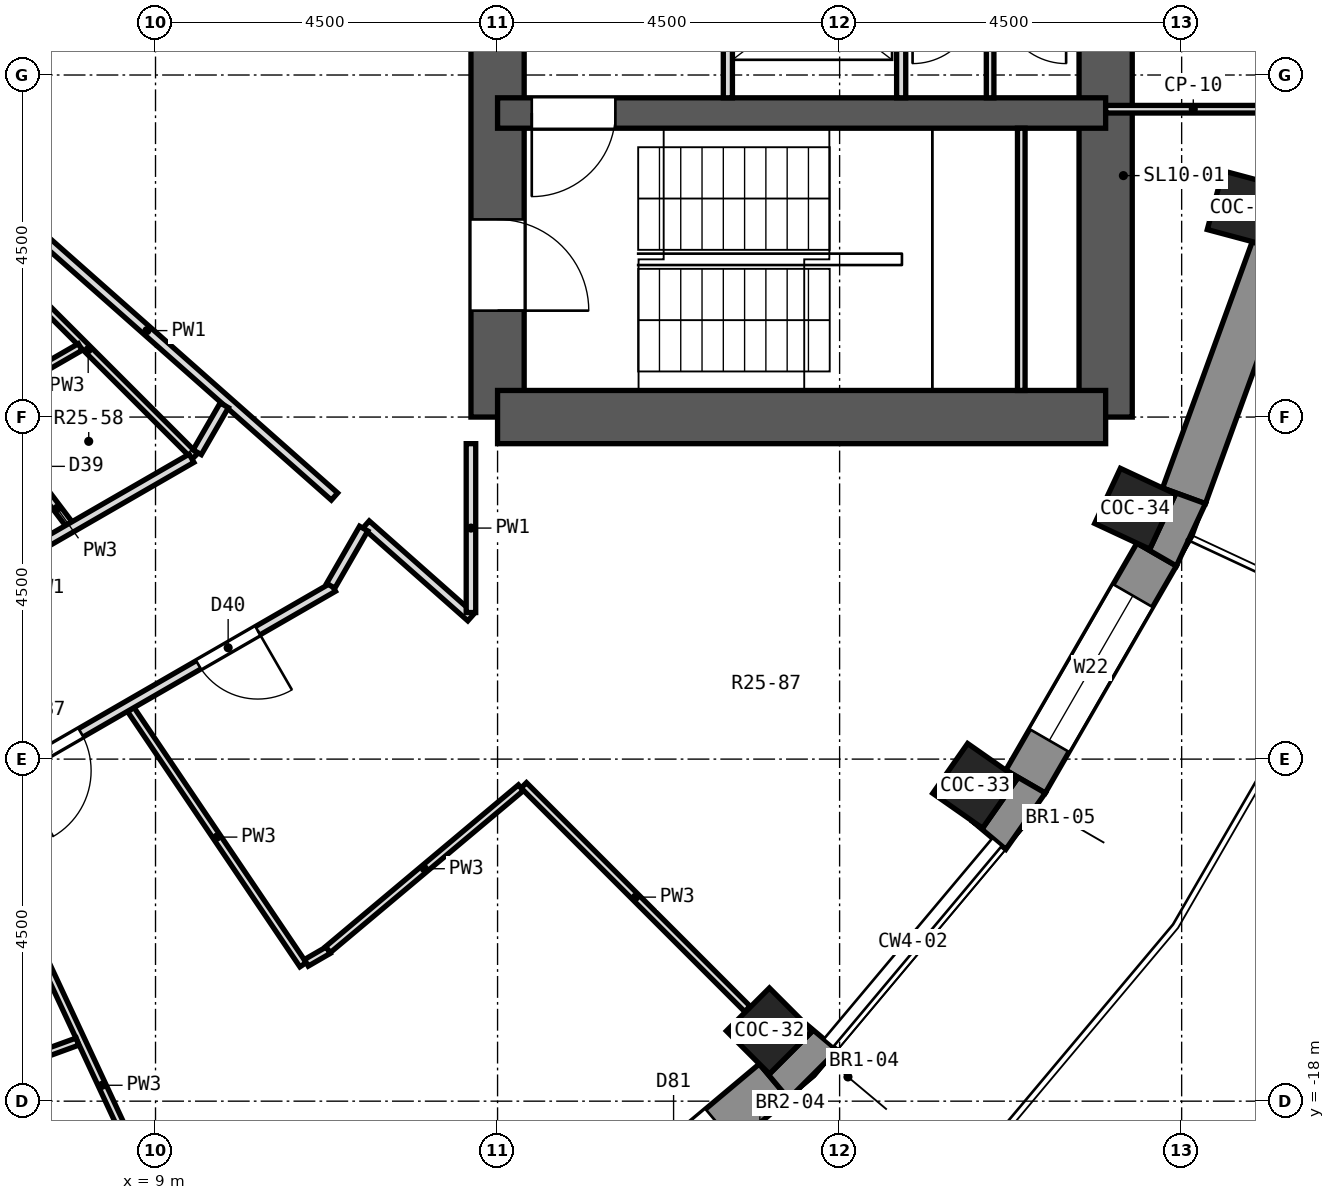
"""IFC4 building model, lengths in metres.
Left out: names, types, materials, properties, quantities, classifications, styles, units other than length and angle.
Written with IfcOpenShell. Run it as: python <this file> out.ifc"""

import sys

from ifc_helpers import new_model, si_unit, direction, frame, frame_2d, origin, origin_2d, place, context, subcontext, project, spatial, polyline, rectangle, outline, extrude, element, fill, save


model = new_model("IFC4")
c1 = context("Model", 3, precision=1e-05, world=origin(), true_north=direction((0.0, 1.0)))
c2 = subcontext(c1, "Body", "Model", "MODEL_VIEW")
j1 = project(units=[si_unit("LENGTHUNIT", "METRE"), si_unit("PLANEANGLEUNIT", "RADIAN")], contexts=[c1])
p1 = place(None, origin())
s1 = spatial("IfcSite", under=j1, at=p1, CompositionType="ELEMENT")
p2 = place(p1, origin())
s2 = spatial("IfcBuilding", under=s1, at=p2, CompositionType="ELEMENT")
p3 = place(p2, frame((0.0, 0.0, 160.8)))
s3 = spatial("IfcBuildingStorey", under=s2, at=p3, CompositionType="ELEMENT", Elevation=160.8)
for number, where, z_axis, x_axis in (
    (1, (17.077, -17.077, 0.0), (0.0, 0.0, 1.0), (0.707, -0.707, 0.0)),
    (2, (19.782, -13.852, 0.0), (0.0, 0.0, 1.0), (0.819, -0.574, 0.0)),
    (3, (21.887, -10.206, 0.0), (0.0, 0.0, 1.0), (0.906, -0.423, 0.0)),
    (4, (23.327, -6.25, 0.0), (0.0, 0.0, 1.0), (0.966, -0.259, 0.0)),
):
    element("IfcColumn", number, at=place(p3, frame(where, z_axis=z_axis, x_axis=x_axis)), inside=s3, PredefinedType="COLUMN", context=c2, shape_type="SweptSolid", body=[
        extrude(rectangle(XDim=0.8, YDim=0.8, at=origin_2d()), origin(), (0.0, 0.0, 1.0), 3.3),
    ])
p4 = place(p3, frame((13.5, -9.0, 0.0), z_axis=(0.0, 0.0, 1.0), x_axis=(0.0, 1.0, 0.0)))
e5 = element("IfcWall", 5, at=p4, inside=s3, PredefinedType="SHEAR", context=c2, shape_type="SweptSolid", body=[
    extrude(rectangle(XDim=18.0, YDim=0.7, at=frame_2d((9.0, 0.0))), origin(), (0.0, 0.0, 1.0), 3.3),
])
p5 = place(p4, frame((15.4, 0.0, 0.0)))
e6 = element("IfcOpeningElement", 6, at=p5, cuts=e5, PredefinedType="OPENING", context=c2, shape_type="SweptSolid", body=[
    extrude(rectangle(XDim=1.2, YDim=2.1, at=frame_2d((0.6, 1.05))), frame((0.0, 0.362, 0.0), z_axis=(0.0, -1.0, 0.0), x_axis=(1.0, 0.0, 0.0)), (0.0, 0.0, 1.0), 0.724),
])
p6 = place(p4, frame((1.4, 0.0, 0.0)))
e7 = element("IfcOpeningElement", 7, at=p6, cuts=e5, PredefinedType="OPENING", context=c2, shape_type="SweptSolid", body=[
    extrude(rectangle(XDim=1.2, YDim=2.1, at=frame_2d((0.6, 1.05))), frame((0.0, 0.362, 0.0), z_axis=(0.0, -1.0, 0.0), x_axis=(1.0, 0.0, 0.0)), (0.0, 0.0, 1.0), 0.724),
])
p7 = place(p4, frame((7.5, 0.0, 0.0)))
e8 = element("IfcOpeningElement", 8, at=p7, cuts=e5, PredefinedType="OPENING", context=c2, shape_type="SweptSolid", body=[
    extrude(rectangle(XDim=3.0, YDim=2.4, at=frame_2d((1.5, 1.2))), frame((0.0, 0.362, 0.0), z_axis=(0.0, -1.0, 0.0), x_axis=(1.0, 0.0, 0.0)), (0.0, 0.0, 1.0), 0.724),
])
p8 = place(p3, frame((21.5, -9.0, 0.0), z_axis=(0.0, 0.0, 1.0), x_axis=(0.0, 1.0, 0.0)))
e9 = element("IfcWall", 9, at=p8, inside=s3, PredefinedType="SHEAR", context=c2, shape_type="SweptSolid", body=[
    extrude(rectangle(XDim=18.0, YDim=0.7, at=frame_2d((9.0, 0.0))), origin(), (0.0, 0.0, 1.0), 3.3),
])
p9 = place(p8, frame((9.45, 0.0, 0.0)))
e10 = element("IfcOpeningElement", 10, at=p9, cuts=e9, PredefinedType="OPENING", context=c2, shape_type="SweptSolid", body=[
    extrude(rectangle(XDim=0.9, YDim=2.1, at=frame_2d((0.45, 1.05))), frame((0.0, 0.362, 0.0), z_axis=(0.0, -1.0, 0.0), x_axis=(1.0, 0.0, 0.0)), (0.0, 0.0, 1.0), 0.724),
])
p10 = place(p8, frame((7.65, 0.0, 0.0)))
e11 = element("IfcOpeningElement", 11, at=p10, cuts=e9, PredefinedType="OPENING", context=c2, shape_type="SweptSolid", body=[
    extrude(rectangle(XDim=0.9, YDim=2.1, at=frame_2d((0.45, 1.05))), frame((0.0, 0.362, 0.0), z_axis=(0.0, -1.0, 0.0), x_axis=(1.0, 0.0, 0.0)), (0.0, 0.0, 1.0), 0.724),
])
p11 = place(p3, frame((13.5, -9.0, 0.0), z_axis=(0.0, 0.0, 1.0), x_axis=(1.0, 0.0, 0.0)))
e12 = element("IfcWall", 12, at=p11, inside=s3, PredefinedType="SHEAR", context=c2, shape_type="SweptSolid", body=[
    extrude(rectangle(XDim=8.0, YDim=0.7, at=frame_2d((4.0, 0.0))), origin(), (0.0, 0.0, 1.0), 3.3),
])
p12 = place(p3, frame((13.5, -5.0, 0.0), z_axis=(0.0, 0.0, 1.0), x_axis=(1.0, 0.0, 0.0)))
e13 = element("IfcWall", 13, at=p12, inside=s3, PredefinedType="SHEAR", context=c2, shape_type="SweptSolid", body=[
    extrude(rectangle(XDim=8.0, YDim=0.4, at=frame_2d((4.0, 0.0))), origin(), (0.0, 0.0, 1.0), 3.3),
])
p13 = place(p12, frame((0.45, 0.0, 0.0)))
e14 = element("IfcOpeningElement", 14, at=p13, cuts=e13, PredefinedType="OPENING", context=c2, shape_type="SweptSolid", body=[
    extrude(rectangle(XDim=1.1, YDim=2.1, at=frame_2d((0.55, 1.05))), frame((0.0, 0.212, 0.0), z_axis=(0.0, -1.0, 0.0), x_axis=(1.0, 0.0, 0.0)), (0.0, 0.0, 1.0), 0.424),
])
p14 = place(p3, frame((14.494, -19.957, 0.0), z_axis=(0.0, 0.0, 1.0), x_axis=(0.766058884809, 0.642770398358, 0.0)))
e15 = element("IfcWall", 15, at=p14, inside=s3, PredefinedType="SOLIDWALL", context=c2, shape_type="SweptSolid", body=[
    extrude(rectangle(XDim=3.449, YDim=0.6, at=frame_2d((1.725, 0.0))), origin(), (0.0, 0.0, 1.0), 2.85),
])
p15 = place(p14, frame((0.925, 0.0, 0.0)))
e16 = element("IfcOpeningElement", 16, at=p15, cuts=e15, PredefinedType="OPENING", context=c2, shape_type="SweptSolid", body=[
    extrude(rectangle(XDim=1.6, YDim=2.4, at=frame_2d((0.8, 1.2))), frame((0.0, 0.312, 0.0), z_axis=(0.0, -1.0, 0.0), x_axis=(1.0, 0.0, 0.0)), (0.0, 0.0, 1.0), 0.624),
])
p16 = place(p3, frame((20.446, -13.796, 0.0), z_axis=(0.0, 0.0, 1.0), x_axis=(0.499998129301, 0.86602648383, 0.0)))
e17 = element("IfcWall", 17, at=p16, inside=s3, PredefinedType="SOLIDWALL", context=c2, shape_type="SweptSolid", body=[
    extrude(rectangle(XDim=3.45, YDim=0.6, at=frame_2d((1.725, 0.0))), origin(), (0.0, 0.0, 1.0), 2.85),
])
p17 = place(p16, frame((0.625, 0.0, 0.9)))
e18 = element("IfcOpeningElement", 18, at=p17, cuts=e17, PredefinedType="OPENING", context=c2, shape_type="SweptSolid", body=[
    extrude(rectangle(XDim=2.2, YDim=1.8, at=frame_2d((1.1, 0.9))), frame((0.0, 0.312, 0.0), z_axis=(0.0, -1.0, 0.0), x_axis=(1.0, 0.0, 0.0)), (0.0, 0.0, 1.0), 0.624),
])
p18 = place(p3, frame((22.531, -10.036, 0.0), z_axis=(0.0, 0.0, 1.0), x_axis=(0.342032843455, 0.93968799822, 0.0)))
e19 = element("IfcWall", 19, at=p18, inside=s3, PredefinedType="SOLIDWALL", context=c2, shape_type="SweptSolid", body=[
    extrude(rectangle(XDim=3.45, YDim=0.6, at=frame_2d((1.725, 0.0))), origin(), (0.0, 0.0, 1.0), 2.85),
])
p19 = place(p3, origin())
e20 = element("IfcWall", 20, at=p19, inside=s3, PredefinedType="SOLIDWALL", context=c2, shape_type="SweptSolid", body=[
    extrude(outline(polyline([(17.969, -17.33), (17.51, -16.944), (17.642, -17.077), (17.077, -17.642), (16.944, -17.51), (17.33, -17.969), (17.969, -17.33)])), origin(), (0.0, 0.0, 1.0), 2.85),
])
p20 = place(p3, origin())
e21 = element("IfcWall", 21, at=p20, inside=s3, PredefinedType="SOLIDWALL", context=c2, shape_type="SweptSolid", body=[
    extrude(outline(polyline([(20.187, -14.687), (20.706, -13.946), (20.186, -13.646), (20.34, -13.754), (19.881, -14.409), (19.727, -14.302), (20.187, -14.687)])), origin(), (0.0, 0.0, 1.0), 2.85),
])
p21 = place(p3, origin())
e22 = element("IfcWall", 22, at=p21, inside=s3, PredefinedType="SOLIDWALL", context=c2, shape_type="SweptSolid", body=[
    extrude(outline(polyline([(22.813, -10.139), (22.249, -9.934), (22.419, -10.013), (22.081, -10.738), (21.911, -10.659), (22.431, -10.959), (22.813, -10.139)])), origin(), (0.0, 0.0, 1.0), 2.85),
])
p22 = place(p3, origin())
e23 = element("IfcWall", 23, at=p22, inside=s3, PredefinedType="SOLIDWALL", context=c2, shape_type="SweptSolid", body=[
    extrude(outline(polyline([(24.227, -6.023), (23.636, -5.919), (23.817, -5.968), (23.61, -6.74), (23.429, -6.692), (23.993, -6.897), (24.227, -6.023)])), origin(), (0.0, 0.0, 1.0), 2.85),
])
p23 = place(p3, frame((6.22, -5.826, 0.0), z_axis=(0.0, 0.0, 1.0), x_axis=(0.500033728941, 0.866005929495, 0.0)))
e24 = element("IfcWall", 24, at=p23, inside=s3, PredefinedType="SOLIDWALL", context=c2, shape_type="SweptSolid", body=[
    extrude(rectangle(XDim=3.87, YDim=0.6, at=frame_2d((1.935, 0.0))), origin(), (0.0, 0.0, 1.0), 2.85),
])
p24 = place(p23, frame((0.735, 0.0, 0.9)))
e25 = element("IfcOpeningElement", 25, at=p24, cuts=e24, PredefinedType="OPENING", context=c2, shape_type="SweptSolid", body=[
    extrude(rectangle(XDim=2.4, YDim=1.8, at=frame_2d((1.2, 0.9))), frame((0.0, 0.312, 0.0), z_axis=(0.0, -1.0, 0.0), x_axis=(1.0, 0.0, 0.0)), (0.0, 0.0, 1.0), 0.624),
])
p25 = place(p3, frame((6.562, -14.066, 0.0), z_axis=(0.0, 0.0, 1.0), x_axis=(0.422374740617, -0.906421302976, 0.0)))
e26 = element("IfcWall", 26, at=p25, inside=s3, PredefinedType="PARTITIONING", context=c2, shape_type="SweptSolid", body=[
    extrude(rectangle(XDim=8.218, YDim=0.1, at=frame_2d((4.109, 0.0))), origin(), (0.0, 0.0, 1.0), 2.85),
])
p26 = place(p3, frame((8.674, -12.847, 0.0), z_axis=(0.0, 0.0, 1.0), x_axis=(0.559460436722, -0.828857056279, 0.0)))
e27 = element("IfcWall", 27, at=p26, inside=s3, PredefinedType="PARTITIONING", context=c2, shape_type="SweptSolid", body=[
    extrude(rectangle(XDim=4.052, YDim=0.1, at=frame_2d((2.026, 0.0))), origin(), (0.0, 0.0, 1.0), 2.85),
])
p27 = place(p3, frame((6.681, -8.844, 0.0), z_axis=(0.0, 0.0, 1.0), x_axis=(0.602656270697, -0.798000889341, 0.0)))
e28 = element("IfcWall", 28, at=p27, inside=s3, PredefinedType="PARTITIONING", context=c2, shape_type="SweptSolid", body=[
    extrude(rectangle(XDim=1.953, YDim=0.1, at=frame_2d((0.977, 0.0))), origin(), (0.0, 0.0, 1.0), 2.85),
])
p28 = place(p27, frame((0.608, 0.0, 0.0)))
e29 = element("IfcOpeningElement", 29, at=p28, cuts=e28, PredefinedType="OPENING", context=c2, shape_type="SweptSolid", body=[
    extrude(rectangle(XDim=0.8, YDim=2.1, at=frame_2d((0.4, 1.05))), frame((0.0, 0.062, 0.0), z_axis=(0.0, -1.0, 0.0), x_axis=(1.0, 0.0, 0.0)), (0.0, 0.0, 1.0), 0.124),
])
p29 = place(p3, frame((6.712, -6.712, 0.0), z_axis=(0.0, 0.0, 1.0), x_axis=(0.707106781187, -0.707106781187, 0.0)))
e30 = element("IfcWall", 30, at=p29, inside=s3, PredefinedType="PARTITIONING", context=c2, shape_type="SweptSolid", body=[
    extrude(rectangle(XDim=3.967, YDim=0.1, at=frame_2d((1.983, 0.0))), origin(), (0.0, 0.0, 1.0), 2.85),
])
p30 = place(p3, frame((13.845, -13.845, 0.0), z_axis=(0.0, 0.0, 1.0), x_axis=(0.707106781187, -0.707106781187, 0.0)))
e31 = element("IfcWall", 31, at=p30, inside=s3, PredefinedType="PARTITIONING", context=c2, shape_type="SweptSolid", body=[
    extrude(rectangle(XDim=4.16, YDim=0.1, at=frame_2d((2.08, 0.0))), origin(), (0.0, 0.0, 1.0), 2.85),
])
p31 = place(p3, frame((6.42, -5.68, 0.0), z_axis=(0.0, 0.0, 1.0), x_axis=(0.748956953748, -0.662618654607, 0.0)))
e32 = element("IfcWall", 32, at=p31, inside=s3, PredefinedType="PARTITIONING", context=c2, shape_type="SweptSolid", body=[
    extrude(rectangle(XDim=6.589, YDim=0.125, at=frame_2d((3.294, 0.0))), origin(), (0.0, 0.0, 1.0), 2.85),
])
p32 = place(p3, frame((11.77, -10.413, 0.0), z_axis=(0.0, 0.0, 1.0), x_axis=(0.748920683101, -0.662659649008, 0.0)))
e33 = element("IfcWall", 33, at=p32, inside=s3, PredefinedType="PARTITIONING", context=c2, shape_type="SweptSolid", body=[
    extrude(rectangle(XDim=1.843, YDim=0.125, at=frame_2d((0.921, 0.0))), origin(), (0.0, 0.0, 1.0), 2.85),
])
p33 = place(p3, frame((4.959, -18.313, 0.0), z_axis=(0.0, 0.0, 1.0), x_axis=(0.939697820391, 0.34200585719, 0.0)))
e34 = element("IfcWall", 34, at=p33, inside=s3, PredefinedType="PARTITIONING", context=c2, shape_type="SweptSolid", body=[
    extrude(rectangle(XDim=3.207, YDim=0.1, at=frame_2d((1.604, 0.0))), origin(), (0.0, 0.0, 1.0), 2.85),
])
p34 = place(p3, frame((10.984, -16.18, 0.0), z_axis=(0.0, 0.0, 1.0), x_axis=(0.865942374699, 0.500143783026, 0.0)))
e35 = element("IfcWall", 35, at=p34, inside=s3, PredefinedType="PARTITIONING", context=c2, shape_type="SweptSolid", body=[
    extrude(rectangle(XDim=0.334, YDim=0.1, at=frame_2d((0.167, 0.0))), origin(), (0.0, 0.0, 1.0), 2.85),
])
p35 = place(p3, frame((4.18, -15.369, 0.0), z_axis=(0.0, 0.0, 1.0), x_axis=(0.86608029966, 0.499904905498, 0.0)))
e36 = element("IfcWall", 36, at=p35, inside=s3, PredefinedType="PARTITIONING", context=c2, shape_type="SweptSolid", body=[
    extrude(rectangle(XDim=8.263, YDim=0.125, at=frame_2d((4.131, 0.0))), origin(), (0.0, 0.0, 1.0), 2.85),
])
p36 = place(p35, frame((3.432, 0.0, 0.0)))
e37 = element("IfcOpeningElement", 37, at=p36, cuts=e36, PredefinedType="OPENING", context=c2, shape_type="SweptSolid", body=[
    extrude(rectangle(XDim=1.0, YDim=2.1, at=frame_2d((0.5, 1.05))), frame((0.0, 0.074, 0.0), z_axis=(0.0, -1.0, 0.0), x_axis=(1.0, 0.0, 0.0)), (0.0, 0.0, 1.0), 0.149),
])
p37 = place(p35, frame((6.219, 0.0, 0.0)))
e38 = element("IfcOpeningElement", 38, at=p37, cuts=e36, PredefinedType="OPENING", context=c2, shape_type="SweptSolid", body=[
    extrude(rectangle(XDim=0.9, YDim=2.1, at=frame_2d((0.45, 1.05))), frame((0.0, 0.074, 0.0), z_axis=(0.0, -1.0, 0.0), x_axis=(1.0, 0.0, 0.0)), (0.0, 0.0, 1.0), 0.149),
])
p38 = place(p3, frame((3.548, -12.962, 0.0), z_axis=(0.0, 0.0, 1.0), x_axis=(0.866078638394, 0.499907783615, 0.0)))
e39 = element("IfcWall", 39, at=p38, inside=s3, PredefinedType="PARTITIONING", context=c2, shape_type="SweptSolid", body=[
    extrude(rectangle(XDim=6.842, YDim=0.125, at=frame_2d((3.421, 0.0))), origin(), (0.0, 0.0, 1.0), 2.85),
])
p39 = place(p38, frame((2.858, 0.0, 0.0)))
e40 = element("IfcOpeningElement", 40, at=p39, cuts=e39, PredefinedType="OPENING", context=c2, shape_type="SweptSolid", body=[
    extrude(rectangle(XDim=1.0, YDim=2.1, at=frame_2d((0.5, 1.05))), frame((0.0, 0.074, 0.0), z_axis=(0.0, -1.0, 0.0), x_axis=(1.0, 0.0, 0.0)), (0.0, 0.0, 1.0), 0.149),
])
p40 = place(p3, frame((6.724, -8.819, 0.0), z_axis=(0.0, 0.0, 1.0), x_axis=(0.866292397233, 0.499537268376, 0.0)))
e41 = element("IfcWall", 41, at=p40, inside=s3, PredefinedType="PARTITIONING", context=c2, shape_type="SweptSolid", body=[
    extrude(rectangle(XDim=1.484, YDim=0.1, at=frame_2d((0.742, 0.0))), origin(), (0.0, 0.0, 1.0), 2.85),
])
p41 = place(p3, frame((11.269, -16.006, 0.0), z_axis=(0.0, 0.0, 1.0), x_axis=(0.766157600424, 0.642652729951, 0.0)))
e42 = element("IfcWall", 42, at=p41, inside=s3, PredefinedType="PARTITIONING", context=c2, shape_type="SweptSolid", body=[
    extrude(rectangle(XDim=3.313, YDim=0.1, at=frame_2d((1.656, 0.0))), origin(), (0.0, 0.0, 1.0), 2.85),
])
p42 = place(p3, frame((9.548, -9.463, 0.0), z_axis=(0.0, 0.0, 1.0), x_axis=(0.499821239653, 0.866128586522, 0.0)))
e43 = element("IfcWall", 43, at=p42, inside=s3, PredefinedType="PARTITIONING", context=c2, shape_type="SweptSolid", body=[
    extrude(rectangle(XDim=0.713, YDim=0.125, at=frame_2d((0.356, 0.0))), origin(), (0.0, 0.0, 1.0), 2.85),
])
p43 = place(p3, frame((11.305, -11.22, 0.0), z_axis=(0.0, 0.0, 1.0), x_axis=(0.499162724547, 0.86650826564, 0.0)))
e44 = element("IfcWall", 44, at=p43, inside=s3, PredefinedType="PARTITIONING", context=c2, shape_type="SweptSolid", body=[
    extrude(rectangle(XDim=0.869, YDim=0.125, at=frame_2d((0.434, 0.0))), origin(), (0.0, 0.0, 1.0), 2.85),
])
p44 = place(p3, frame((13.15, -11.572, 0.0), z_axis=(0.0, 0.0, 1.0), x_axis=(0.0, 1.0, 0.0)))
e45 = element("IfcWall", 45, at=p44, inside=s3, PredefinedType="PARTITIONING", context=c2, shape_type="SweptSolid", body=[
    extrude(rectangle(XDim=2.221, YDim=0.125, at=frame_2d((1.111, 0.0))), origin(), (0.0, 0.0, 1.0), 2.85),
])
p45 = place(p3, frame((21.5, -4.95, 0.0), z_axis=(0.0, 0.0, 1.0), x_axis=(1.0, 0.0, 0.0)))
e46 = element("IfcWall", 46, at=p45, inside=s3, PredefinedType="PARTITIONING", context=c2, shape_type="SweptSolid", body=[
    extrude(rectangle(XDim=2.307, YDim=0.1, at=frame_2d((1.153, 0.0))), origin(), (0.0, 0.0, 1.0), 2.85),
])
p46 = place(p3, frame((16.53, -4.8, 0.0), z_axis=(0.0, 0.0, 1.0), x_axis=(0.0, 1.0, 0.0)))
e47 = element("IfcWall", 47, at=p46, inside=s3, PredefinedType="PARTITIONING", context=c2, shape_type="SweptSolid", body=[
    extrude(rectangle(XDim=2.6, YDim=0.12, at=frame_2d((1.3, 0.0))), origin(), (0.0, 0.0, 1.0), 2.85),
])
p47 = place(p46, frame((0.75, 0.0, 0.0)))
e48 = element("IfcOpeningElement", 48, at=p47, cuts=e47, PredefinedType="OPENING", context=c2, shape_type="SweptSolid", body=[
    extrude(rectangle(XDim=1.1, YDim=2.1, at=frame_2d((0.55, 1.05))), frame((0.0, 0.072, 0.0), z_axis=(0.0, -1.0, 0.0), x_axis=(1.0, 0.0, 0.0)), (0.0, 0.0, 1.0), 0.144),
])
p48 = place(p3, frame((18.81, -4.8, 0.0), z_axis=(0.0, 0.0, 1.0), x_axis=(0.0, 1.0, 0.0)))
e49 = element("IfcWall", 49, at=p48, inside=s3, PredefinedType="PARTITIONING", context=c2, shape_type="SweptSolid", body=[
    extrude(rectangle(XDim=2.6, YDim=0.12, at=frame_2d((1.3, 0.0))), origin(), (0.0, 0.0, 1.0), 2.85),
])
p49 = place(p3, frame((19.98, -4.8, 0.0), z_axis=(0.0, 0.0, 1.0), x_axis=(0.0, 1.0, 0.0)))
e50 = element("IfcWall", 50, at=p49, inside=s3, PredefinedType="PARTITIONING", context=c2, shape_type="SweptSolid", body=[
    extrude(rectangle(XDim=2.6, YDim=0.1, at=frame_2d((1.3, 0.0))), origin(), (0.0, 0.0, 1.0), 2.85),
])
p50 = place(p3, frame((20.39, -8.65, 0.0), z_axis=(0.0, 0.0, 1.0), x_axis=(0.0, 1.0, 0.0)))
e51 = element("IfcWall", 51, at=p50, inside=s3, PredefinedType="PARTITIONING", context=c2, shape_type="SweptSolid", body=[
    extrude(rectangle(XDim=3.45, YDim=0.1, at=frame_2d((1.725, 0.0))), origin(), (0.0, 0.0, 1.0), 2.85),
])
p51 = place(p15, frame((1.6, 0.0, 0.0), z_axis=(0.0, 0.0, 1.0), x_axis=(-1.0, 0.0, 0.0)))
e52 = element("IfcDoor", 52, at=p51, inside=s3, OperationType="DOUBLE_DOOR_SINGLE_SWING", PredefinedType="DOOR", context=c2, shape_type="SweptSolid", body=[
    extrude(rectangle(XDim=1.6, YDim=2.4, at=frame_2d((0.8, 1.2))), frame((0.0, -0.075, 0.0), z_axis=(0.0, -1.0, 0.0), x_axis=(1.0, 0.0, 0.0)), (0.0, 0.0, 1.0), 0.05),
])
fill(e16, e52)
p52 = place(p17, origin())
e53 = element("IfcWindow", 53, at=p52, inside=s3, PartitioningType="SINGLE_PANEL", PredefinedType="WINDOW", context=c2, shape_type="SweptSolid", body=[
    extrude(rectangle(XDim=2.2, YDim=1.8, at=frame_2d((1.1, 0.9))), frame((0.0, 0.18, 0.0), z_axis=(0.0, -1.0, 0.0), x_axis=(1.0, 0.0, 0.0)), (0.0, 0.0, 1.0), 0.06),
])
fill(e18, e53)
p53 = place(p24, origin())
e54 = element("IfcWindow", 54, at=p53, inside=s3, PartitioningType="SINGLE_PANEL", PredefinedType="WINDOW", context=c2, shape_type="SweptSolid", body=[
    extrude(rectangle(XDim=2.4, YDim=1.8, at=frame_2d((1.2, 0.9))), frame((0.0, -0.12, 0.0), z_axis=(0.0, -1.0, 0.0), x_axis=(1.0, 0.0, 0.0)), (0.0, 0.0, 1.0), 0.06),
])
fill(e25, e54)
p54 = place(p36, frame((1.0, 0.0, 0.0), z_axis=(0.0, 0.0, 1.0), x_axis=(-1.0, 0.0, 0.0)))
e55 = element("IfcDoor", 55, at=p54, inside=s3, OperationType="SINGLE_SWING_RIGHT", PredefinedType="DOOR", context=c2, shape_type="SweptSolid", body=[
    extrude(rectangle(XDim=1.0, YDim=2.1, at=frame_2d((0.5, 1.05))), frame((0.0, 0.025, 0.0), z_axis=(0.0, -1.0, 0.0), x_axis=(1.0, 0.0, 0.0)), (0.0, 0.0, 1.0), 0.05),
])
fill(e37, e55)
p55 = place(p37, frame((0.9, 0.0, 0.0), z_axis=(0.0, 0.0, 1.0), x_axis=(-1.0, 0.0, 0.0)))
e56 = element("IfcDoor", 56, at=p55, inside=s3, OperationType="SINGLE_SWING_LEFT", PredefinedType="DOOR", context=c2, shape_type="SweptSolid", body=[
    extrude(rectangle(XDim=0.9, YDim=2.1, at=frame_2d((0.45, 1.05))), frame((0.0, 0.025, 0.0), z_axis=(0.0, -1.0, 0.0), x_axis=(1.0, 0.0, 0.0)), (0.0, 0.0, 1.0), 0.05),
])
fill(e38, e56)
p56 = place(p13, frame((1.1, 0.0, 0.0), z_axis=(0.0, 0.0, 1.0), x_axis=(-1.0, 0.0, 0.0)))
e57 = element("IfcDoor", 57, at=p56, inside=s3, OperationType="SINGLE_SWING_RIGHT", PredefinedType="DOOR", context=c2, shape_type="SweptSolid", body=[
    extrude(rectangle(XDim=1.1, YDim=2.1, at=frame_2d((0.55, 1.05))), frame((0.0, 0.025, 0.0), z_axis=(0.0, -1.0, 0.0), x_axis=(1.0, 0.0, 0.0)), (0.0, 0.0, 1.0), 0.05),
])
fill(e14, e57)
p57 = place(p6, frame((1.2, 0.0, 0.0), z_axis=(0.0, 0.0, 1.0), x_axis=(-1.0, 0.0, 0.0)))
e58 = element("IfcDoor", 58, at=p57, inside=s3, OperationType="SINGLE_SWING_RIGHT", PredefinedType="DOOR", context=c2, shape_type="SweptSolid", body=[
    extrude(rectangle(XDim=1.2, YDim=2.1, at=frame_2d((0.6, 1.05))), frame((0.0, 0.025, 0.0), z_axis=(0.0, -1.0, 0.0), x_axis=(1.0, 0.0, 0.0)), (0.0, 0.0, 1.0), 0.05),
])
fill(e7, e58)
save(model, sys.argv[1])
